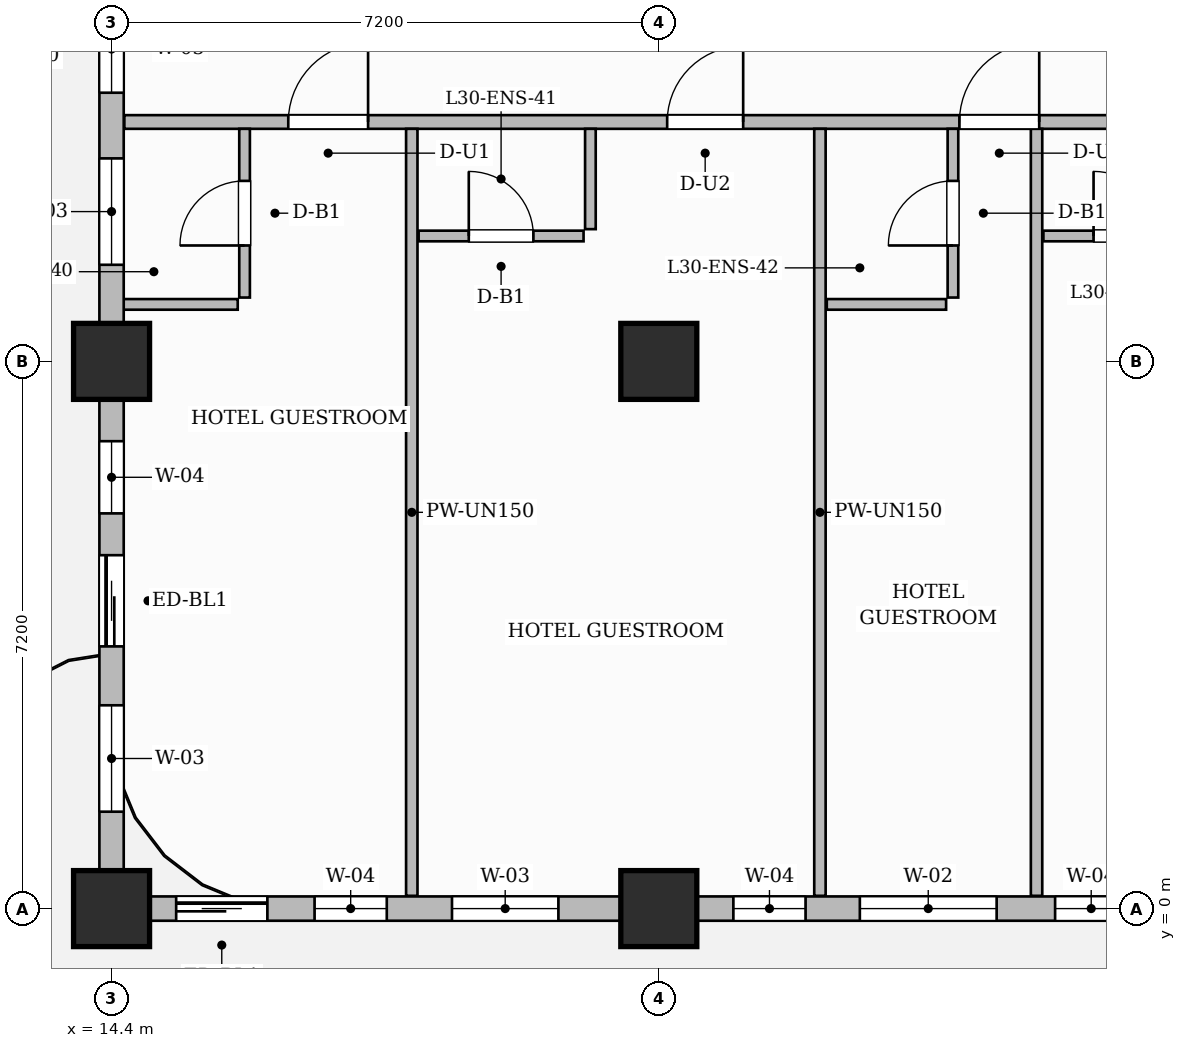
"""IFC4 building model, lengths in metres.
Left out: names, types, materials, properties, quantities, classifications, styles, units other than length and angle.
Written with IfcOpenShell. Run it as: python <this file> out.ifc"""

import sys

from ifc_helpers import new_model, si_unit, direction, frame, frame_2d, origin, origin_2d, place, context, subcontext, project, spatial, rectangle, extrude, source, transform, mapped, element, fill, save


model = new_model("IFC4")
c1 = context("Model", 3, precision=1e-05, world=origin(), true_north=direction((0.0, 1.0)))
c2 = subcontext(c1, "Body", "Model", "MODEL_VIEW")
j1 = project(units=[si_unit("LENGTHUNIT", "METRE"), si_unit("PLANEANGLEUNIT", "RADIAN")], contexts=[c1])
p1 = place(None, origin())
s1 = spatial("IfcSite", under=j1, at=p1, CompositionType="ELEMENT")
p2 = place(p1, origin())
s2 = spatial("IfcBuilding", under=s1, at=p2, CompositionType="ELEMENT")
p3 = place(p2, frame((0.0, 0.0, 122.9)))
s3 = spatial("IfcBuildingStorey", under=s2, at=p3, CompositionType="ELEMENT", Elevation=122.9)
m1 = source(origin(), c2, "Body", "SweptSolid", [
    extrude(rectangle(XDim=1.0, YDim=1.0, at=origin_2d()), origin(), (0.0, 0.0, 1.0), 3.7),
])
for number, where, z_axis, x_axis in (
    (1, (14.4, 0.0, 0.0), (0.0, 0.0, 1.0), (1.0, 0.0, 0.0)),
    (2, (14.4, 7.2, 0.0), (0.0, 0.0, 1.0), (1.0, 0.0, 0.0)),
    (3, (21.6, 0.0, 0.0), (0.0, 0.0, 1.0), (1.0, 0.0, 0.0)),
    (4, (21.6, 7.2, 0.0), (0.0, 0.0, 1.0), (1.0, 0.0, 0.0)),
):
    element("IfcColumn", number, at=place(p3, frame(where, z_axis=z_axis, x_axis=x_axis)), inside=s3, PredefinedType="COLUMN", context=c2, shape_type="MappedRepresentation", body=[
        mapped(m1, transform((0.0, 0.0, 0.0), scale=1.0)),
    ])
p4 = place(p3, frame((14.568, 10.35, 0.0), z_axis=(0.0, 0.0, 1.0), x_axis=(1.0, 0.0, 0.0)))
e5 = element("IfcWall", 5, at=p4, inside=s3, PredefinedType="PARTITIONING", context=c2, shape_type="SweptSolid", body=[
    extrude(rectangle(XDim=15.542, YDim=0.18, at=frame_2d((7.771, 0.0))), origin(), (0.0, 0.0, 1.0), 3.45),
])
p5 = place(p4, frame((2.157, 0.0, 0.0)))
e6 = element("IfcOpeningElement", 6, at=p5, cuts=e5, PredefinedType="OPENING", context=c2, shape_type="SweptSolid", body=[
    extrude(rectangle(XDim=1.05, YDim=2.25, at=frame_2d((0.525, 1.125))), frame((0.0, 0.1, 0.0), z_axis=(0.0, -1.0, 0.0), x_axis=(1.0, 0.0, 0.0)), (0.0, 0.0, 1.0), 0.2),
])
p6 = place(p4, frame((7.142, 0.0, 0.0)))
e7 = element("IfcOpeningElement", 7, at=p6, cuts=e5, PredefinedType="OPENING", context=c2, shape_type="SweptSolid", body=[
    extrude(rectangle(XDim=1.0, YDim=2.2, at=frame_2d((0.5, 1.1))), frame((0.0, 0.1, 0.0), z_axis=(0.0, -1.0, 0.0), x_axis=(1.0, 0.0, 0.0)), (0.0, 0.0, 1.0), 0.2),
])
p7 = place(p4, frame((10.987, 0.0, 0.0)))
e8 = element("IfcOpeningElement", 8, at=p7, cuts=e5, PredefinedType="OPENING", context=c2, shape_type="SweptSolid", body=[
    extrude(rectangle(XDim=1.05, YDim=2.25, at=frame_2d((0.525, 1.125))), frame((0.0, 0.1, 0.0), z_axis=(0.0, -1.0, 0.0), x_axis=(1.0, 0.0, 0.0)), (0.0, 0.0, 1.0), 0.2),
])
p8 = place(p4, frame((14.402, 0.0, 0.0)))
e9 = element("IfcOpeningElement", 9, at=p8, cuts=e5, PredefinedType="OPENING", context=c2, shape_type="SweptSolid", body=[
    extrude(rectangle(XDim=1.0, YDim=2.2, at=frame_2d((0.5, 1.1))), frame((0.0, 0.1, 0.0), z_axis=(0.0, -1.0, 0.0), x_axis=(1.0, 0.0, 0.0)), (0.0, 0.0, 1.0), 0.2),
])
p9 = place(p3, frame((16.15, 8.04, 0.0), z_axis=(0.0, 0.0, 1.0), x_axis=(0.0, 1.0, 0.0)))
e10 = element("IfcWall", 10, at=p9, inside=s3, PredefinedType="PARTITIONING", context=c2, shape_type="SweptSolid", body=[
    extrude(rectangle(XDim=2.22, YDim=0.14, at=frame_2d((1.11, 0.0))), origin(), (0.0, 0.0, 1.0), 3.45),
])
p10 = place(p9, frame((0.685, 0.0, 0.0)))
e11 = element("IfcOpeningElement", 11, at=p10, cuts=e10, PredefinedType="OPENING", context=c2, shape_type="SweptSolid", body=[
    extrude(rectangle(XDim=0.85, YDim=2.1, at=frame_2d((0.425, 1.05))), frame((0.0, 0.08, 0.0), z_axis=(0.0, -1.0, 0.0), x_axis=(1.0, 0.0, 0.0)), (0.0, 0.0, 1.0), 0.16),
])
p11 = place(p3, frame((14.49, 7.95, 0.0), z_axis=(0.0, 0.0, 1.0), x_axis=(1.0, 0.0, 0.0)))
e12 = element("IfcWall", 12, at=p11, inside=s3, PredefinedType="PARTITIONING", context=c2, shape_type="SweptSolid", body=[
    extrude(rectangle(XDim=1.57, YDim=0.14, at=frame_2d((0.785, 0.0))), origin(), (0.0, 0.0, 1.0), 3.45),
])
p12 = place(p3, frame((18.35, 0.168, 0.0), z_axis=(0.0, 0.0, 1.0), x_axis=(0.0, 1.0, 0.0)))
e13 = element("IfcWall", 13, at=p12, inside=s3, PredefinedType="PARTITIONING", context=c2, shape_type="SweptSolid", body=[
    extrude(rectangle(XDim=10.092, YDim=0.15, at=frame_2d((5.046, 0.0))), origin(), (0.0, 0.0, 1.0), 3.45),
])
p13 = place(p3, frame((20.7, 8.94, 0.0), z_axis=(0.0, 0.0, 1.0), x_axis=(0.0, 1.0, 0.0)))
e14 = element("IfcWall", 14, at=p13, inside=s3, PredefinedType="PARTITIONING", context=c2, shape_type="SweptSolid", body=[
    extrude(rectangle(XDim=1.32, YDim=0.14, at=frame_2d((0.66, 0.0))), origin(), (0.0, 0.0, 1.0), 3.45),
])
p14 = place(p3, frame((18.44, 8.85, 0.0), z_axis=(0.0, 0.0, 1.0), x_axis=(1.0, 0.0, 0.0)))
e15 = element("IfcWall", 15, at=p14, inside=s3, PredefinedType="PARTITIONING", context=c2, shape_type="SweptSolid", body=[
    extrude(rectangle(XDim=2.17, YDim=0.14, at=frame_2d((1.085, 0.0))), origin(), (0.0, 0.0, 1.0), 3.45),
])
p15 = place(p14, frame((0.66, 0.0, 0.0)))
e16 = element("IfcOpeningElement", 16, at=p15, cuts=e15, PredefinedType="OPENING", context=c2, shape_type="SweptSolid", body=[
    extrude(rectangle(XDim=0.85, YDim=2.1, at=frame_2d((0.425, 1.05))), frame((0.0, 0.08, 0.0), z_axis=(0.0, -1.0, 0.0), x_axis=(1.0, 0.0, 0.0)), (0.0, 0.0, 1.0), 0.16),
])
p16 = place(p3, frame((23.72, 0.168, 0.0), z_axis=(0.0, 0.0, 1.0), x_axis=(0.0, 1.0, 0.0)))
e17 = element("IfcWall", 17, at=p16, inside=s3, PredefinedType="PARTITIONING", context=c2, shape_type="SweptSolid", body=[
    extrude(rectangle(XDim=10.092, YDim=0.15, at=frame_2d((5.046, 0.0))), origin(), (0.0, 0.0, 1.0), 3.45),
])
p17 = place(p3, frame((25.47, 8.04, 0.0), z_axis=(0.0, 0.0, 1.0), x_axis=(0.0, 1.0, 0.0)))
e18 = element("IfcWall", 18, at=p17, inside=s3, PredefinedType="PARTITIONING", context=c2, shape_type="SweptSolid", body=[
    extrude(rectangle(XDim=2.22, YDim=0.14, at=frame_2d((1.11, 0.0))), origin(), (0.0, 0.0, 1.0), 3.45),
])
p18 = place(p17, frame((0.685, 0.0, 0.0)))
e19 = element("IfcOpeningElement", 19, at=p18, cuts=e18, PredefinedType="OPENING", context=c2, shape_type="SweptSolid", body=[
    extrude(rectangle(XDim=0.85, YDim=2.1, at=frame_2d((0.425, 1.05))), frame((0.0, 0.08, 0.0), z_axis=(0.0, -1.0, 0.0), x_axis=(1.0, 0.0, 0.0)), (0.0, 0.0, 1.0), 0.16),
])
p19 = place(p3, frame((23.81, 7.95, 0.0), z_axis=(0.0, 0.0, 1.0), x_axis=(1.0, 0.0, 0.0)))
e20 = element("IfcWall", 20, at=p19, inside=s3, PredefinedType="PARTITIONING", context=c2, shape_type="SweptSolid", body=[
    extrude(rectangle(XDim=1.57, YDim=0.14, at=frame_2d((0.785, 0.0))), origin(), (0.0, 0.0, 1.0), 3.45),
])
p20 = place(p3, frame((26.57, 0.168, 0.0), z_axis=(0.0, 0.0, 1.0), x_axis=(0.0, 1.0, 0.0)))
e21 = element("IfcWall", 21, at=p20, inside=s3, PredefinedType="PARTITIONING", context=c2, shape_type="SweptSolid", body=[
    extrude(rectangle(XDim=10.092, YDim=0.15, at=frame_2d((5.046, 0.0))), origin(), (0.0, 0.0, 1.0), 3.45),
])
p21 = place(p3, frame((26.66, 8.85, 0.0), z_axis=(0.0, 0.0, 1.0), x_axis=(1.0, 0.0, 0.0)))
e22 = element("IfcWall", 22, at=p21, inside=s3, PredefinedType="PARTITIONING", context=c2, shape_type="SweptSolid", body=[
    extrude(rectangle(XDim=2.17, YDim=0.14, at=frame_2d((1.085, 0.0))), origin(), (0.0, 0.0, 1.0), 3.45),
])
p22 = place(p21, frame((0.66, 0.0, 0.0)))
e23 = element("IfcOpeningElement", 23, at=p22, cuts=e22, PredefinedType="OPENING", context=c2, shape_type="SweptSolid", body=[
    extrude(rectangle(XDim=0.85, YDim=2.1, at=frame_2d((0.425, 1.05))), frame((0.0, 0.08, 0.0), z_axis=(0.0, -1.0, 0.0), x_axis=(1.0, 0.0, 0.0)), (0.0, 0.0, 1.0), 0.16),
])
p23 = place(p3, frame((14.4, 0.0, 0.0), z_axis=(0.0, 0.0, 1.0), x_axis=(1.0, 0.0, 0.0)))
e24 = element("IfcWall", 24, at=p23, inside=s3, PredefinedType="SOLIDWALL", context=c2, shape_type="SweptSolid", body=[
    extrude(rectangle(XDim=35.4, YDim=0.32, at=frame_2d((17.7, 0.0))), origin(), (0.0, 0.0, 1.0), 2.935),
])
p24 = place(p23, frame((0.85, 0.0, 0.0)))
e25 = element("IfcOpeningElement", 25, at=p24, cuts=e24, PredefinedType="OPENING", context=c2, shape_type="SweptSolid", body=[
    extrude(rectangle(XDim=1.2, YDim=2.2, at=frame_2d((0.6, 1.1))), frame((0.0, 0.17, 0.0), z_axis=(0.0, -1.0, 0.0), x_axis=(1.0, 0.0, 0.0)), (0.0, 0.0, 1.0), 0.34),
])
p25 = place(p23, frame((2.671, 0.0, 0.8)))
e26 = element("IfcOpeningElement", 26, at=p25, cuts=e24, PredefinedType="OPENING", context=c2, shape_type="SweptSolid", body=[
    extrude(rectangle(XDim=0.95, YDim=1.75, at=frame_2d((0.475, 0.875))), frame((0.0, 0.17, 0.0), z_axis=(0.0, -1.0, 0.0), x_axis=(1.0, 0.0, 0.0)), (0.0, 0.0, 1.0), 0.34),
])
p26 = place(p23, frame((4.479, 0.0, 0.8)))
e27 = element("IfcOpeningElement", 27, at=p26, cuts=e24, PredefinedType="OPENING", context=c2, shape_type="SweptSolid", body=[
    extrude(rectangle(XDim=1.4, YDim=1.85, at=frame_2d((0.7, 0.925))), frame((0.0, 0.17, 0.0), z_axis=(0.0, -1.0, 0.0), x_axis=(1.0, 0.0, 0.0)), (0.0, 0.0, 1.0), 0.34),
])
p27 = place(p23, frame((8.181, 0.0, 0.8)))
e28 = element("IfcOpeningElement", 28, at=p27, cuts=e24, PredefinedType="OPENING", context=c2, shape_type="SweptSolid", body=[
    extrude(rectangle(XDim=0.95, YDim=1.75, at=frame_2d((0.475, 0.875))), frame((0.0, 0.17, 0.0), z_axis=(0.0, -1.0, 0.0), x_axis=(1.0, 0.0, 0.0)), (0.0, 0.0, 1.0), 0.34),
])
p28 = place(p23, frame((9.845, 0.0, 0.8)))
e29 = element("IfcOpeningElement", 29, at=p28, cuts=e24, PredefinedType="OPENING", context=c2, shape_type="SweptSolid", body=[
    extrude(rectangle(XDim=1.8, YDim=1.85, at=frame_2d((0.9, 0.925))), frame((0.0, 0.17, 0.0), z_axis=(0.0, -1.0, 0.0), x_axis=(1.0, 0.0, 0.0)), (0.0, 0.0, 1.0), 0.34),
])
p29 = place(p23, frame((12.414, 0.0, 0.8)))
e30 = element("IfcOpeningElement", 30, at=p29, cuts=e24, PredefinedType="OPENING", context=c2, shape_type="SweptSolid", body=[
    extrude(rectangle(XDim=0.95, YDim=1.75, at=frame_2d((0.475, 0.875))), frame((0.0, 0.17, 0.0), z_axis=(0.0, -1.0, 0.0), x_axis=(1.0, 0.0, 0.0)), (0.0, 0.0, 1.0), 0.34),
])
p30 = place(p23, frame((16.804, 0.0, 0.8)))
e31 = element("IfcOpeningElement", 31, at=p30, cuts=e24, PredefinedType="OPENING", context=c2, shape_type="SweptSolid", body=[
    extrude(rectangle(XDim=1.8, YDim=1.85, at=frame_2d((0.9, 0.925))), frame((0.0, 0.17, 0.0), z_axis=(0.0, -1.0, 0.0), x_axis=(1.0, 0.0, 0.0)), (0.0, 0.0, 1.0), 0.34),
])
p31 = place(p23, frame((21.725, 0.0, 0.8)))
e32 = element("IfcOpeningElement", 32, at=p31, cuts=e24, PredefinedType="OPENING", context=c2, shape_type="SweptSolid", body=[
    extrude(rectangle(XDim=1.8, YDim=1.85, at=frame_2d((0.9, 0.925))), frame((0.0, 0.17, 0.0), z_axis=(0.0, -1.0, 0.0), x_axis=(1.0, 0.0, 0.0)), (0.0, 0.0, 1.0), 0.34),
])
p32 = place(p23, frame((24.475, 0.0, 0.8)))
e33 = element("IfcOpeningElement", 33, at=p32, cuts=e24, PredefinedType="OPENING", context=c2, shape_type="SweptSolid", body=[
    extrude(rectangle(XDim=1.8, YDim=1.85, at=frame_2d((0.9, 0.925))), frame((0.0, 0.17, 0.0), z_axis=(0.0, -1.0, 0.0), x_axis=(1.0, 0.0, 0.0)), (0.0, 0.0, 1.0), 0.34),
])
p33 = place(p23, frame((29.075, 0.0, 0.8)))
e34 = element("IfcOpeningElement", 34, at=p33, cuts=e24, PredefinedType="OPENING", context=c2, shape_type="SweptSolid", body=[
    extrude(rectangle(XDim=1.8, YDim=1.85, at=frame_2d((0.9, 0.925))), frame((0.0, 0.17, 0.0), z_axis=(0.0, -1.0, 0.0), x_axis=(1.0, 0.0, 0.0)), (0.0, 0.0, 1.0), 0.34),
])
p34 = place(p23, frame((32.125, 0.0, 0.8)))
e35 = element("IfcOpeningElement", 35, at=p34, cuts=e24, PredefinedType="OPENING", context=c2, shape_type="SweptSolid", body=[
    extrude(rectangle(XDim=1.8, YDim=1.85, at=frame_2d((0.9, 0.925))), frame((0.0, 0.17, 0.0), z_axis=(0.0, -1.0, 0.0), x_axis=(1.0, 0.0, 0.0)), (0.0, 0.0, 1.0), 0.34),
])
p35 = place(p3, frame((14.4, 0.05, 0.0), z_axis=(0.0, 0.0, 1.0), x_axis=(0.0, 1.0, 0.0)))
e36 = element("IfcWall", 36, at=p35, inside=s3, PredefinedType="SOLIDWALL", context=c2, shape_type="SweptSolid", body=[
    extrude(rectangle(XDim=20.6, YDim=0.32, at=frame_2d((10.3, 0.0))), origin(), (0.0, 0.0, 1.0), 2.935),
])
p36 = place(p35, frame((3.4, 0.0, 0.0)))
e37 = element("IfcOpeningElement", 37, at=p36, cuts=e36, PredefinedType="OPENING", context=c2, shape_type="SweptSolid", body=[
    extrude(rectangle(XDim=1.2, YDim=2.2, at=frame_2d((0.6, 1.1))), frame((0.0, 0.17, 0.0), z_axis=(0.0, -1.0, 0.0), x_axis=(1.0, 0.0, 0.0)), (0.0, 0.0, 1.0), 0.34),
])
p37 = place(p35, frame((1.225, 0.0, 0.8)))
e38 = element("IfcOpeningElement", 38, at=p37, cuts=e36, PredefinedType="OPENING", context=c2, shape_type="SweptSolid", body=[
    extrude(rectangle(XDim=1.4, YDim=1.85, at=frame_2d((0.7, 0.925))), frame((0.0, 0.17, 0.0), z_axis=(0.0, -1.0, 0.0), x_axis=(1.0, 0.0, 0.0)), (0.0, 0.0, 1.0), 0.34),
])
p38 = place(p35, frame((5.15, 0.0, 0.8)))
e39 = element("IfcOpeningElement", 39, at=p38, cuts=e36, PredefinedType="OPENING", context=c2, shape_type="SweptSolid", body=[
    extrude(rectangle(XDim=0.95, YDim=1.75, at=frame_2d((0.475, 0.875))), frame((0.0, 0.17, 0.0), z_axis=(0.0, -1.0, 0.0), x_axis=(1.0, 0.0, 0.0)), (0.0, 0.0, 1.0), 0.34),
])
p39 = place(p35, frame((8.421, 0.0, 0.8)))
e40 = element("IfcOpeningElement", 40, at=p39, cuts=e36, PredefinedType="OPENING", context=c2, shape_type="SweptSolid", body=[
    extrude(rectangle(XDim=1.4, YDim=1.85, at=frame_2d((0.7, 0.925))), frame((0.0, 0.17, 0.0), z_axis=(0.0, -1.0, 0.0), x_axis=(1.0, 0.0, 0.0)), (0.0, 0.0, 1.0), 0.34),
])
p40 = place(p35, frame((10.685, 0.0, 0.8)))
e41 = element("IfcOpeningElement", 41, at=p40, cuts=e36, PredefinedType="OPENING", context=c2, shape_type="SweptSolid", body=[
    extrude(rectangle(XDim=1.15, YDim=1.8, at=frame_2d((0.575, 0.9))), frame((0.0, 0.17, 0.0), z_axis=(0.0, -1.0, 0.0), x_axis=(1.0, 0.0, 0.0)), (0.0, 0.0, 1.0), 0.34),
])
p41 = place(p35, frame((12.414, 0.0, 0.8)))
e42 = element("IfcOpeningElement", 42, at=p41, cuts=e36, PredefinedType="OPENING", context=c2, shape_type="SweptSolid", body=[
    extrude(rectangle(XDim=0.95, YDim=1.75, at=frame_2d((0.475, 0.875))), frame((0.0, 0.17, 0.0), z_axis=(0.0, -1.0, 0.0), x_axis=(1.0, 0.0, 0.0)), (0.0, 0.0, 1.0), 0.34),
])
p42 = place(p35, frame((16.79, 0.0, 0.8)))
e43 = element("IfcOpeningElement", 43, at=p42, cuts=e36, PredefinedType="OPENING", context=c2, shape_type="SweptSolid", body=[
    extrude(rectangle(XDim=1.8, YDim=1.85, at=frame_2d((0.9, 0.925))), frame((0.0, 0.17, 0.0), z_axis=(0.0, -1.0, 0.0), x_axis=(1.0, 0.0, 0.0)), (0.0, 0.0, 1.0), 0.34),
])
m2 = source(origin(), c2, "Body", "SweptSolid", [
    extrude(rectangle(XDim=0.85, YDim=2.1, at=frame_2d((0.425, 1.05))), frame((0.0, 0.025, 0.0), z_axis=(0.0, -1.0, 0.0), x_axis=(1.0, 0.0, 0.0)), (0.0, 0.0, 1.0), 0.05),
])
p43 = place(p10, origin())
e44 = element("IfcDoor", 44, at=p43, inside=s3, OperationType="SINGLE_SWING_LEFT", PredefinedType="DOOR", context=c2, shape_type="MappedRepresentation", body=[
    mapped(m2, transform((0.0, 0.0, 0.0), scale=1.0)),
])
fill(e11, e44)
m3 = source(origin(), c2, "Body", "SweptSolid", [
    extrude(rectangle(XDim=1.05, YDim=2.25, at=frame_2d((0.525, 1.125))), frame((0.0, 0.025, 0.0), z_axis=(0.0, -1.0, 0.0), x_axis=(1.0, 0.0, 0.0)), (0.0, 0.0, 1.0), 0.05),
])
p44 = place(p5, origin())
e45 = element("IfcDoor", 45, at=p44, inside=s3, OperationType="SINGLE_SWING_RIGHT", PredefinedType="DOOR", context=c2, shape_type="MappedRepresentation", body=[
    mapped(m3, transform((0.0, 0.0, 0.0), scale=1.0)),
])
fill(e6, e45)
p45 = place(p15, origin())
e46 = element("IfcDoor", 46, at=p45, inside=s3, OperationType="SINGLE_SWING_LEFT", PredefinedType="DOOR", context=c2, shape_type="MappedRepresentation", body=[
    mapped(m2, transform((0.0, 0.0, 0.0), scale=1.0)),
])
fill(e16, e46)
m4 = source(origin(), c2, "Body", "SweptSolid", [
    extrude(rectangle(XDim=1.0, YDim=2.2, at=frame_2d((0.5, 1.1))), frame((0.0, 0.025, 0.0), z_axis=(0.0, -1.0, 0.0), x_axis=(1.0, 0.0, 0.0)), (0.0, 0.0, 1.0), 0.05),
])
p46 = place(p6, origin())
e47 = element("IfcDoor", 47, at=p46, inside=s3, OperationType="SINGLE_SWING_RIGHT", PredefinedType="DOOR", context=c2, shape_type="MappedRepresentation", body=[
    mapped(m4, transform((0.0, 0.0, 0.0), scale=1.0)),
])
fill(e7, e47)
p47 = place(p18, origin())
e48 = element("IfcDoor", 48, at=p47, inside=s3, OperationType="SINGLE_SWING_LEFT", PredefinedType="DOOR", context=c2, shape_type="MappedRepresentation", body=[
    mapped(m2, transform((0.0, 0.0, 0.0), scale=1.0)),
])
fill(e19, e48)
p48 = place(p7, origin())
e49 = element("IfcDoor", 49, at=p48, inside=s3, OperationType="SINGLE_SWING_RIGHT", PredefinedType="DOOR", context=c2, shape_type="MappedRepresentation", body=[
    mapped(m3, transform((0.0, 0.0, 0.0), scale=1.0)),
])
fill(e8, e49)
p49 = place(p22, origin())
e50 = element("IfcDoor", 50, at=p49, inside=s3, OperationType="SINGLE_SWING_LEFT", PredefinedType="DOOR", context=c2, shape_type="MappedRepresentation", body=[
    mapped(m2, transform((0.0, 0.0, 0.0), scale=1.0)),
])
fill(e23, e50)
m5 = source(origin(), c2, "Body", "SweptSolid", [
    extrude(rectangle(XDim=1.2, YDim=2.2, at=frame_2d((0.6, 1.1))), frame((0.0, 0.025, 0.0), z_axis=(0.0, -1.0, 0.0), x_axis=(1.0, 0.0, 0.0)), (0.0, 0.0, 1.0), 0.05),
])
p50 = place(p24, origin())
e51 = element("IfcDoor", 51, at=p50, inside=s3, OperationType="SLIDING_TO_LEFT", PredefinedType="DOOR", context=c2, shape_type="MappedRepresentation", body=[
    mapped(m5, transform((0.0, 0.0, 0.0), scale=1.0)),
])
fill(e25, e51)
p51 = place(p36, origin())
e52 = element("IfcDoor", 52, at=p51, inside=s3, OperationType="SLIDING_TO_LEFT", PredefinedType="DOOR", context=c2, shape_type="MappedRepresentation", body=[
    mapped(m5, transform((0.0, 0.0, 0.0), scale=1.0)),
])
fill(e37, e52)
m6 = source(origin(), c2, "Body", "SweptSolid", [
    extrude(rectangle(XDim=0.95, YDim=1.75, at=frame_2d((0.475, 0.875))), frame((0.0, 0.03, 0.0), z_axis=(0.0, -1.0, 0.0), x_axis=(1.0, 0.0, 0.0)), (0.0, 0.0, 1.0), 0.06),
])
p52 = place(p25, origin())
e53 = element("IfcWindow", 53, at=p52, inside=s3, PartitioningType="SINGLE_PANEL", PredefinedType="WINDOW", context=c2, shape_type="MappedRepresentation", body=[
    mapped(m6, transform((0.0, 0.0, 0.0), scale=1.0)),
])
fill(e26, e53)
m7 = source(origin(), c2, "Body", "SweptSolid", [
    extrude(rectangle(XDim=1.4, YDim=1.85, at=frame_2d((0.7, 0.925))), frame((0.0, 0.03, 0.0), z_axis=(0.0, -1.0, 0.0), x_axis=(1.0, 0.0, 0.0)), (0.0, 0.0, 1.0), 0.06),
])
p53 = place(p26, origin())
e54 = element("IfcWindow", 54, at=p53, inside=s3, PartitioningType="SINGLE_PANEL", PredefinedType="WINDOW", context=c2, shape_type="MappedRepresentation", body=[
    mapped(m7, transform((0.0, 0.0, 0.0), scale=1.0)),
])
fill(e27, e54)
p54 = place(p27, origin())
e55 = element("IfcWindow", 55, at=p54, inside=s3, PartitioningType="SINGLE_PANEL", PredefinedType="WINDOW", context=c2, shape_type="MappedRepresentation", body=[
    mapped(m6, transform((0.0, 0.0, 0.0), scale=1.0)),
])
fill(e28, e55)
m8 = source(origin(), c2, "Body", "SweptSolid", [
    extrude(rectangle(XDim=1.8, YDim=1.85, at=frame_2d((0.9, 0.925))), frame((0.0, 0.03, 0.0), z_axis=(0.0, -1.0, 0.0), x_axis=(1.0, 0.0, 0.0)), (0.0, 0.0, 1.0), 0.06),
])
p55 = place(p28, origin())
e56 = element("IfcWindow", 56, at=p55, inside=s3, PartitioningType="DOUBLE_PANEL_VERTICAL", PredefinedType="WINDOW", context=c2, shape_type="MappedRepresentation", body=[
    mapped(m8, transform((0.0, 0.0, 0.0), scale=1.0)),
])
fill(e29, e56)
p56 = place(p29, origin())
e57 = element("IfcWindow", 57, at=p56, inside=s3, PartitioningType="SINGLE_PANEL", PredefinedType="WINDOW", context=c2, shape_type="MappedRepresentation", body=[
    mapped(m6, transform((0.0, 0.0, 0.0), scale=1.0)),
])
fill(e30, e57)
p57 = place(p37, origin())
e58 = element("IfcWindow", 58, at=p57, inside=s3, PartitioningType="SINGLE_PANEL", PredefinedType="WINDOW", context=c2, shape_type="MappedRepresentation", body=[
    mapped(m7, transform((0.0, 0.0, 0.0), scale=1.0)),
])
fill(e38, e58)
p58 = place(p38, origin())
e59 = element("IfcWindow", 59, at=p58, inside=s3, PartitioningType="SINGLE_PANEL", PredefinedType="WINDOW", context=c2, shape_type="MappedRepresentation", body=[
    mapped(m6, transform((0.0, 0.0, 0.0), scale=1.0)),
])
fill(e39, e59)
p59 = place(p39, origin())
e60 = element("IfcWindow", 60, at=p59, inside=s3, PartitioningType="SINGLE_PANEL", PredefinedType="WINDOW", context=c2, shape_type="MappedRepresentation", body=[
    mapped(m7, transform((0.0, 0.0, 0.0), scale=1.0)),
])
fill(e40, e60)
m9 = source(origin(), c2, "Body", "SweptSolid", [
    extrude(rectangle(XDim=1.15, YDim=1.8, at=frame_2d((0.575, 0.9))), frame((0.0, 0.03, 0.0), z_axis=(0.0, -1.0, 0.0), x_axis=(1.0, 0.0, 0.0)), (0.0, 0.0, 1.0), 0.06),
])
p60 = place(p40, origin())
e61 = element("IfcWindow", 61, at=p60, inside=s3, PartitioningType="SINGLE_PANEL", PredefinedType="WINDOW", context=c2, shape_type="MappedRepresentation", body=[
    mapped(m9, transform((0.0, 0.0, 0.0), scale=1.0)),
])
fill(e41, e61)
save(model, sys.argv[1])
